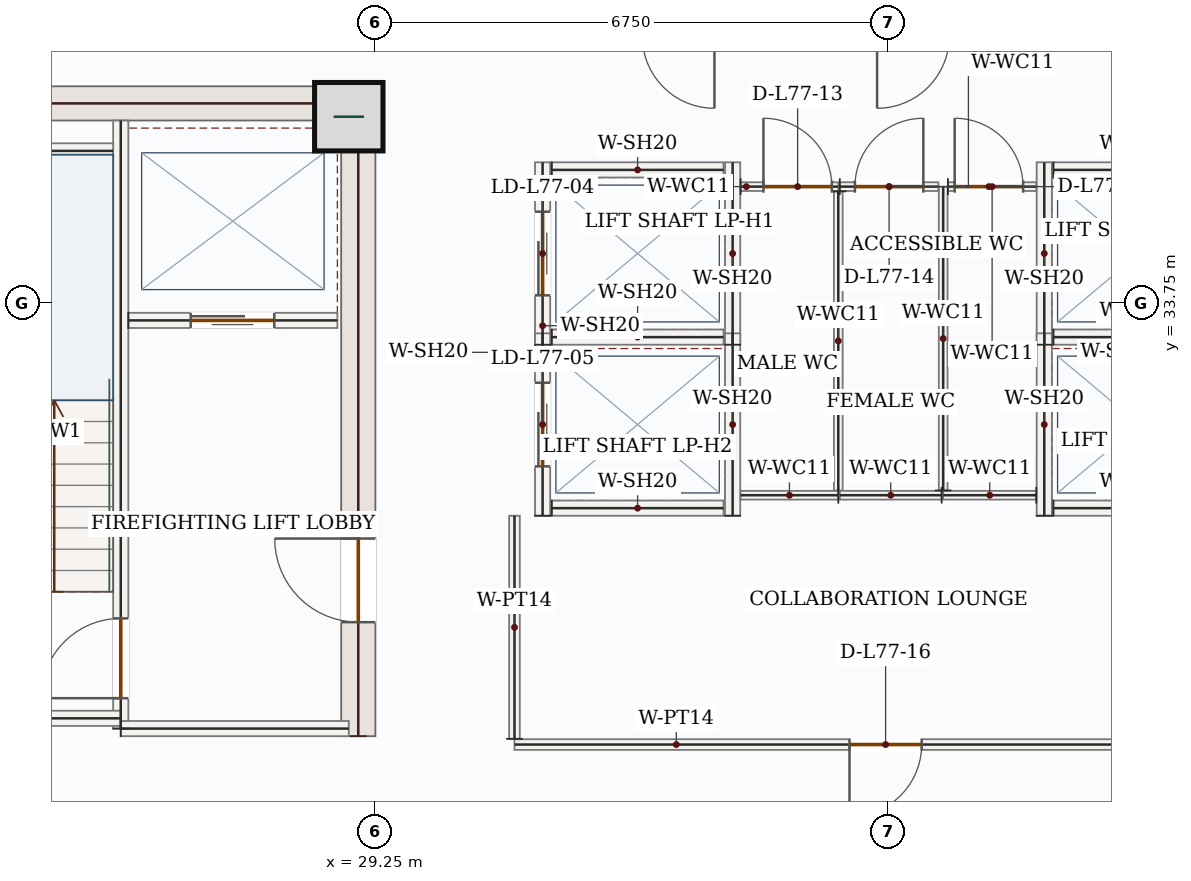
"""IFC4 building model, lengths in metres.
Left out: names, types, materials, properties, quantities, classifications, styles, units other than length and angle.
Written with IfcOpenShell. Run it as: python <this file> out.ifc"""

import sys

from ifc_helpers import new_model, si_unit, direction, frame, frame_2d, origin, origin_2d, place, context, subcontext, project, spatial, rectangle, extrude, source, transform, mapped, element, fill, save


model = new_model("IFC4")
c1 = context("Model", 3, precision=1e-05, world=origin(), true_north=direction((0.0, 1.0)))
c2 = subcontext(c1, "Body", "Model", "MODEL_VIEW")
j1 = project(units=[si_unit("LENGTHUNIT", "METRE"), si_unit("PLANEANGLEUNIT", "RADIAN")], contexts=[c1])
p1 = place(None, origin())
s1 = spatial("IfcSite", under=j1, at=p1, CompositionType="ELEMENT")
p2 = place(p1, origin())
s2 = spatial("IfcBuilding", under=s1, at=p2, CompositionType="ELEMENT")
p3 = place(p2, frame((0.0, 0.0, 319.8)))
s3 = spatial("IfcBuildingStorey", under=s2, at=p3, CompositionType="ELEMENT", Elevation=319.8)
p4 = place(p3, frame((29.025, 28.05, 0.0), z_axis=(0.0, 0.0, 1.0), x_axis=(0.0, 1.0, 0.0)))
e1 = element("IfcWall", 1, at=p4, inside=s3, PredefinedType="SHEAR", context=c2, shape_type="SweptSolid", body=[
    extrude(rectangle(XDim=8.55, YDim=0.45, at=frame_2d((4.275, 0.0))), origin(), (0.0, 0.0, 1.0), 3.5),
])
p5 = place(p4, frame((1.5, 0.0, 0.0)))
e2 = element("IfcOpeningElement", 2, at=p5, cuts=e1, PredefinedType="OPENING", context=c2, shape_type="SweptSolid", body=[
    extrude(rectangle(XDim=1.1, YDim=2.2, at=frame_2d((0.55, 1.1))), frame((0.0, 0.235, 0.0), z_axis=(0.0, -1.0, 0.0), x_axis=(1.0, 0.0, 0.0)), (0.0, 0.0, 1.0), 0.47),
])
m1 = source(origin(), c2, "Body", "SweptSolid", [
    extrude(rectangle(XDim=7.1, YDim=0.45, at=frame_2d((3.55, 0.0))), origin(), (0.0, 0.0, 1.0), 3.5),
])
p6 = place(p3, frame((21.7, 36.375, 0.0), z_axis=(0.0, 0.0, 1.0), x_axis=(1.0, 0.0, 0.0)))
e3 = element("IfcWall", 3, at=p6, inside=s3, PredefinedType="SHEAR", context=c2, shape_type="MappedRepresentation", body=[
    mapped(m1, transform((0.0, 0.0, 0.0), x_axis=(1.0, 0.0, 0.0), y_axis=(0.0, 1.0, 0.0), z_axis=(0.0, 0.0, 1.0), scale=1.0)),
])
m2 = source(origin(), c2, "Body", "SweptSolid", [
    extrude(rectangle(XDim=0.9, YDim=0.9, at=origin_2d()), origin(), (0.0, 0.0, 1.0), 3.75),
])
p7 = place(p3, frame((28.9, 36.2, 0.0), z_axis=(0.0, 0.0, 1.0), x_axis=(1.0, 0.0, 0.0)))
e4 = element("IfcColumn", 4, at=p7, inside=s3, PredefinedType="COLUMN", context=c2, shape_type="MappedRepresentation", body=[
    mapped(m2, transform((0.0, 0.0, 0.0), x_axis=(1.0, 0.0, 0.0), y_axis=(0.0, 1.0, 0.0), z_axis=(0.0, 0.0, 1.0), scale=1.0)),
])
p8 = place(p3, frame((25.9, 28.15, 0.0), z_axis=(0.0, 0.0, 1.0), x_axis=(0.0, 1.0, 0.0)))
e5 = element("IfcWall", 5, at=p8, inside=s3, PredefinedType="SOLIDWALL", context=c2, shape_type="SweptSolid", body=[
    extrude(rectangle(XDim=8.0, YDim=0.2, at=frame_2d((4.0, 0.0))), origin(), (0.0, 0.0, 1.0), 3.5),
])
p9 = place(p8, frame((0.4, 0.0, 0.0)))
e6 = element("IfcOpeningElement", 6, at=p9, cuts=e5, PredefinedType="OPENING", context=c2, shape_type="SweptSolid", body=[
    extrude(rectangle(XDim=1.05, YDim=2.15, at=frame_2d((0.525, 1.075))), frame((0.0, 0.11, 0.0), z_axis=(0.0, -1.0, 0.0), x_axis=(1.0, 0.0, 0.0)), (0.0, 0.0, 1.0), 0.22),
])
m3 = source(origin(), c2, "Body", "SweptSolid", [
    extrude(rectangle(XDim=4.25, YDim=0.2, at=frame_2d((2.125, 0.0))), origin(), (0.0, 0.0, 1.0), 3.5),
])
p10 = place(p3, frame((21.65, 28.285, 0.0), z_axis=(0.0, 0.0, 1.0), x_axis=(1.0, 0.0, 0.0)))
e7 = element("IfcWall", 7, at=p10, inside=s3, PredefinedType="SOLIDWALL", context=c2, shape_type="MappedRepresentation", body=[
    mapped(m3, transform((0.0, 0.0, 0.0), x_axis=(1.0, 0.0, 0.0), y_axis=(0.0, 1.0, 0.0), z_axis=(0.0, 0.0, 1.0), scale=1.0)),
])
m4 = source(origin(), c2, "Body", "SweptSolid", [
    extrude(rectangle(XDim=3.0, YDim=0.2, at=frame_2d((1.5, 0.0))), origin(), (0.0, 0.0, 1.0), 3.5),
])
p11 = place(p3, frame((25.9, 28.15, 0.0), z_axis=(0.0, 0.0, 1.0), x_axis=(1.0, 0.0, 0.0)))
e8 = element("IfcWall", 8, at=p11, inside=s3, PredefinedType="SOLIDWALL", context=c2, shape_type="MappedRepresentation", body=[
    mapped(m4, transform((0.0, 0.0, 0.0), x_axis=(1.0, 0.0, 0.0), y_axis=(0.0, 1.0, 0.0), z_axis=(0.0, 0.0, 1.0), scale=1.0)),
])
m5 = source(origin(), c2, "Body", "SweptSolid", [
    extrude(rectangle(XDim=3.25, YDim=0.2, at=frame_2d((1.625, 0.0))), origin(), (0.0, 0.0, 1.0), 3.5),
])
p12 = place(p3, frame((22.55, 35.75, 0.0), z_axis=(0.0, 0.0, 1.0), x_axis=(1.0, 0.0, 0.0)))
e9 = element("IfcWall", 9, at=p12, inside=s3, PredefinedType="SOLIDWALL", context=c2, shape_type="MappedRepresentation", body=[
    mapped(m5, transform((0.0, 0.0, 0.0), x_axis=(1.0, 0.0, 0.0), y_axis=(0.0, 1.0, 0.0), z_axis=(0.0, 0.0, 1.0), scale=1.0)),
])
p13 = place(p3, frame((26.0, 33.52, 0.0), z_axis=(0.0, 0.0, 1.0), x_axis=(1.0, 0.0, 0.0)))
e10 = element("IfcWall", 10, at=p13, inside=s3, PredefinedType="SOLIDWALL", context=c2, shape_type="SweptSolid", body=[
    extrude(rectangle(XDim=2.75, YDim=0.2, at=frame_2d((1.375, 0.0))), origin(), (0.0, 0.0, 1.0), 3.5),
])
p14 = place(p13, frame((0.82, 0.0, 0.0)))
e11 = element("IfcOpeningElement", 11, at=p14, cuts=e10, PredefinedType="OPENING", context=c2, shape_type="SweptSolid", body=[
    extrude(rectangle(XDim=1.1, YDim=2.15, at=frame_2d((0.55, 1.075))), frame((0.0, 0.11, 0.0), z_axis=(0.0, -1.0, 0.0), x_axis=(1.0, 0.0, 0.0)), (0.0, 0.0, 1.0), 0.22),
])
p15 = place(p3, frame((31.45, 33.2, 0.0), z_axis=(0.0, 0.0, 1.0), x_axis=(0.0, 1.0, 0.0)))
e12 = element("IfcWall", 12, at=p15, inside=s3, PredefinedType="SOLIDWALL", context=c2, shape_type="SweptSolid", body=[
    extrude(rectangle(XDim=2.4, YDim=0.2, at=frame_2d((1.2, 0.0))), origin(), (0.0, 0.0, 1.0), 3.5),
])
p16 = place(p15, frame((0.65, 0.0, 0.0)))
e13 = element("IfcOpeningElement", 13, at=p16, cuts=e12, PredefinedType="OPENING", context=c2, shape_type="SweptSolid", body=[
    extrude(rectangle(XDim=1.1, YDim=2.15, at=frame_2d((0.55, 1.075))), frame((0.0, 0.11, 0.0), z_axis=(0.0, -1.0, 0.0), x_axis=(1.0, 0.0, 0.0)), (0.0, 0.0, 1.0), 0.22),
])
m6 = source(origin(), c2, "Body", "SweptSolid", [
    extrude(rectangle(XDim=2.4, YDim=0.2, at=frame_2d((1.2, 0.0))), origin(), (0.0, 0.0, 1.0), 3.5),
])
p17 = place(p3, frame((33.95, 33.2, 0.0), z_axis=(0.0, 0.0, 1.0), x_axis=(0.0, 1.0, 0.0)))
e14 = element("IfcWall", 14, at=p17, inside=s3, PredefinedType="SOLIDWALL", context=c2, shape_type="MappedRepresentation", body=[
    mapped(m6, transform((0.0, 0.0, 0.0), x_axis=(1.0, 0.0, 0.0), y_axis=(0.0, 1.0, 0.0), z_axis=(0.0, 0.0, 1.0), scale=1.0)),
])
m7 = source(origin(), c2, "Body", "SweptSolid", [
    extrude(rectangle(XDim=2.26, YDim=0.2, at=frame_2d((1.13, 0.0))), origin(), (0.0, 0.0, 1.0), 3.5),
])
for number, where, z_axis, x_axis in (
    (15, (31.57, 33.3, 0.0), (0.0, 0.0, 1.0), (1.0, 0.0, 0.0)),
    (16, (31.57, 35.5, 0.0), (0.0, 0.0, 1.0), (1.0, 0.0, 0.0)),
):
    element("IfcWall", number, at=place(p3, frame(where, z_axis=z_axis, x_axis=x_axis)), inside=s3, PredefinedType="SOLIDWALL", context=c2, shape_type="MappedRepresentation", body=[
        mapped(m7, transform((0.0, 0.0, 0.0), x_axis=(1.0, 0.0, 0.0), y_axis=(0.0, 1.0, 0.0), z_axis=(0.0, 0.0, 1.0), scale=1.0)),
    ])
p18 = place(p3, frame((31.45, 30.95, 0.0), z_axis=(0.0, 0.0, 1.0), x_axis=(0.0, 1.0, 0.0)))
e17 = element("IfcWall", 17, at=p18, inside=s3, PredefinedType="SOLIDWALL", context=c2, shape_type="SweptSolid", body=[
    extrude(rectangle(XDim=2.4, YDim=0.2, at=frame_2d((1.2, 0.0))), origin(), (0.0, 0.0, 1.0), 3.5),
])
p19 = place(p18, frame((0.65, 0.0, 0.0)))
e18 = element("IfcOpeningElement", 18, at=p19, cuts=e17, PredefinedType="OPENING", context=c2, shape_type="SweptSolid", body=[
    extrude(rectangle(XDim=1.1, YDim=2.15, at=frame_2d((0.55, 1.075))), frame((0.0, 0.11, 0.0), z_axis=(0.0, -1.0, 0.0), x_axis=(1.0, 0.0, 0.0)), (0.0, 0.0, 1.0), 0.22),
])
p20 = place(p3, frame((33.95, 30.95, 0.0), z_axis=(0.0, 0.0, 1.0), x_axis=(0.0, 1.0, 0.0)))
e19 = element("IfcWall", 19, at=p20, inside=s3, PredefinedType="SOLIDWALL", context=c2, shape_type="MappedRepresentation", body=[
    mapped(m6, transform((0.0, 0.0, 0.0), x_axis=(1.0, 0.0, 0.0), y_axis=(0.0, 1.0, 0.0), z_axis=(0.0, 0.0, 1.0), scale=1.0)),
])
p21 = place(p3, frame((31.57, 31.05, 0.0), z_axis=(0.0, 0.0, 1.0), x_axis=(1.0, 0.0, 0.0)))
e20 = element("IfcWall", 20, at=p21, inside=s3, PredefinedType="SOLIDWALL", context=c2, shape_type="MappedRepresentation", body=[
    mapped(m7, transform((0.0, 0.0, 0.0), x_axis=(1.0, 0.0, 0.0), y_axis=(0.0, 1.0, 0.0), z_axis=(0.0, 0.0, 1.0), scale=1.0)),
])
p22 = place(p3, frame((38.05, 33.2, 0.0), z_axis=(0.0, 0.0, 1.0), x_axis=(0.0, 1.0, 0.0)))
e21 = element("IfcWall", 21, at=p22, inside=s3, PredefinedType="SOLIDWALL", context=c2, shape_type="MappedRepresentation", body=[
    mapped(m6, transform((0.0, 0.0, 0.0), x_axis=(1.0, 0.0, 0.0), y_axis=(0.0, 1.0, 0.0), z_axis=(0.0, 0.0, 1.0), scale=1.0)),
])
for number, where, z_axis, x_axis in (
    (22, (38.17, 33.3, 0.0), (0.0, 0.0, 1.0), (1.0, 0.0, 0.0)),
    (23, (38.17, 35.5, 0.0), (0.0, 0.0, 1.0), (1.0, 0.0, 0.0)),
):
    element("IfcWall", number, at=place(p3, frame(where, z_axis=z_axis, x_axis=x_axis)), inside=s3, PredefinedType="SOLIDWALL", context=c2, shape_type="MappedRepresentation", body=[
        mapped(m7, transform((0.0, 0.0, 0.0), x_axis=(1.0, 0.0, 0.0), y_axis=(0.0, 1.0, 0.0), z_axis=(0.0, 0.0, 1.0), scale=1.0)),
    ])
p23 = place(p3, frame((38.05, 30.95, 0.0), z_axis=(0.0, 0.0, 1.0), x_axis=(0.0, 1.0, 0.0)))
e24 = element("IfcWall", 24, at=p23, inside=s3, PredefinedType="SOLIDWALL", context=c2, shape_type="MappedRepresentation", body=[
    mapped(m6, transform((0.0, 0.0, 0.0), x_axis=(1.0, 0.0, 0.0), y_axis=(0.0, 1.0, 0.0), z_axis=(0.0, 0.0, 1.0), scale=1.0)),
])
p24 = place(p3, frame((38.17, 31.05, 0.0), z_axis=(0.0, 0.0, 1.0), x_axis=(1.0, 0.0, 0.0)))
e25 = element("IfcWall", 25, at=p24, inside=s3, PredefinedType="SOLIDWALL", context=c2, shape_type="MappedRepresentation", body=[
    mapped(m7, transform((0.0, 0.0, 0.0), x_axis=(1.0, 0.0, 0.0), y_axis=(0.0, 1.0, 0.0), z_axis=(0.0, 0.0, 1.0), scale=1.0)),
])
m8 = source(origin(), c2, "Body", "SweptSolid", [
    extrude(rectangle(XDim=1.225, YDim=0.115, at=frame_2d((0.613, 0.0))), origin(), (0.0, 0.0, 1.0), 3.5),
])
p25 = place(p3, frame((37.945, 31.22, 0.0), z_axis=(0.0, 0.0, 1.0), x_axis=(-1.0, 0.0, 0.0)))
e26 = element("IfcWall", 26, at=p25, inside=s3, PredefinedType="PARTITIONING", context=c2, shape_type="MappedRepresentation", body=[
    mapped(m8, transform((0.0, 0.0, 0.0), x_axis=(1.0, 0.0, 0.0), y_axis=(0.0, 1.0, 0.0), z_axis=(0.0, 0.0, 1.0), scale=1.0)),
])
m9 = source(origin(), c2, "Body", "SweptSolid", [
    extrude(rectangle(XDim=3.998, YDim=0.115, at=frame_2d((1.999, 0.0))), origin(), (0.0, 0.0, 1.0), 3.5),
])
p26 = place(p3, frame((36.72, 31.282, 0.0), z_axis=(0.0, 0.0, 1.0), x_axis=(0.0, 1.0, 0.0)))
e27 = element("IfcWall", 27, at=p26, inside=s3, PredefinedType="PARTITIONING", context=c2, shape_type="MappedRepresentation", body=[
    mapped(m9, transform((0.0, 0.0, 0.0), x_axis=(1.0, 0.0, 0.0), y_axis=(0.0, 1.0, 0.0), z_axis=(0.0, 0.0, 1.0), scale=1.0)),
])
p27 = place(p3, frame((36.782, 35.28, 0.0), z_axis=(0.0, 0.0, 1.0), x_axis=(1.0, 0.0, 0.0)))
e28 = element("IfcWall", 28, at=p27, inside=s3, PredefinedType="PARTITIONING", context=c2, shape_type="SweptSolid", body=[
    extrude(rectangle(XDim=1.163, YDim=0.115, at=frame_2d((0.581, 0.0))), origin(), (0.0, 0.0, 1.0), 3.5),
])
p28 = place(p27, frame((0.089, 0.0, 0.0)))
e29 = element("IfcOpeningElement", 29, at=p28, cuts=e28, PredefinedType="OPENING", context=c2, shape_type="SweptSolid", body=[
    extrude(rectangle(XDim=0.9, YDim=2.1, at=frame_2d((0.45, 1.05))), frame((0.0, 0.067, 0.0), z_axis=(0.0, -1.0, 0.0), x_axis=(1.0, 0.0, 0.0)), (0.0, 0.0, 1.0), 0.135),
])
m10 = source(origin(), c2, "Body", "SweptSolid", [
    extrude(rectangle(XDim=1.285, YDim=0.115, at=frame_2d((0.643, 0.0))), origin(), (0.0, 0.0, 1.0), 3.5),
])
p29 = place(p3, frame((35.34, 31.22, 0.0), z_axis=(0.0, 0.0, 1.0), x_axis=(-1.0, 0.0, 0.0)))
e30 = element("IfcWall", 30, at=p29, inside=s3, PredefinedType="PARTITIONING", context=c2, shape_type="MappedRepresentation", body=[
    mapped(m10, transform((0.0, 0.0, 0.0), x_axis=(1.0, 0.0, 0.0), y_axis=(0.0, 1.0, 0.0), z_axis=(0.0, 0.0, 1.0), scale=1.0)),
])
p30 = place(p3, frame((34.055, 35.28, 0.0), z_axis=(0.0, 0.0, 1.0), x_axis=(1.0, 0.0, 0.0)))
e31 = element("IfcWall", 31, at=p30, inside=s3, PredefinedType="PARTITIONING", context=c2, shape_type="SweptSolid", body=[
    extrude(rectangle(XDim=1.285, YDim=0.115, at=frame_2d((0.643, 0.0))), origin(), (0.0, 0.0, 1.0), 3.5),
])
p31 = place(p30, frame((0.3, 0.0, 0.0)))
e32 = element("IfcOpeningElement", 32, at=p31, cuts=e31, PredefinedType="OPENING", context=c2, shape_type="SweptSolid", body=[
    extrude(rectangle(XDim=0.9, YDim=2.1, at=frame_2d((0.45, 1.05))), frame((0.0, 0.067, 0.0), z_axis=(0.0, -1.0, 0.0), x_axis=(1.0, 0.0, 0.0)), (0.0, 0.0, 1.0), 0.135),
])
m11 = source(origin(), c2, "Body", "SweptSolid", [
    extrude(rectangle(XDim=3.935, YDim=0.115, at=frame_2d((1.968, 0.0))), origin(), (0.0, 0.0, 1.0), 3.5),
])
p32 = place(p3, frame((35.34, 35.218, 0.0), z_axis=(0.0, 0.0, 1.0), x_axis=(0.0, -1.0, 0.0)))
e33 = element("IfcWall", 33, at=p32, inside=s3, PredefinedType="PARTITIONING", context=c2, shape_type="MappedRepresentation", body=[
    mapped(m11, transform((0.0, 0.0, 0.0), x_axis=(1.0, 0.0, 0.0), y_axis=(0.0, 1.0, 0.0), z_axis=(0.0, 0.0, 1.0), scale=1.0)),
])
m12 = source(origin(), c2, "Body", "SweptSolid", [
    extrude(rectangle(XDim=1.34, YDim=0.115, at=frame_2d((0.67, 0.0))), origin(), (0.0, 0.0, 1.0), 3.5),
])
p33 = place(p3, frame((36.7, 31.22, 0.0), z_axis=(0.0, 0.0, 1.0), x_axis=(-1.0, 0.0, 0.0)))
e34 = element("IfcWall", 34, at=p33, inside=s3, PredefinedType="PARTITIONING", context=c2, shape_type="MappedRepresentation", body=[
    mapped(m12, transform((0.0, 0.0, 0.0), x_axis=(1.0, 0.0, 0.0), y_axis=(0.0, 1.0, 0.0), z_axis=(0.0, 0.0, 1.0), scale=1.0)),
])
p34 = place(p3, frame((35.36, 35.28, 0.0), z_axis=(0.0, 0.0, 1.0), x_axis=(1.0, 0.0, 0.0)))
e35 = element("IfcWall", 35, at=p34, inside=s3, PredefinedType="PARTITIONING", context=c2, shape_type="SweptSolid", body=[
    extrude(rectangle(XDim=1.297, YDim=0.115, at=frame_2d((0.649, 0.0))), origin(), (0.0, 0.0, 1.0), 3.5),
])
p35 = place(p34, frame((0.199, 0.0, 0.0)))
e36 = element("IfcOpeningElement", 36, at=p35, cuts=e35, PredefinedType="OPENING", context=c2, shape_type="SweptSolid", body=[
    extrude(rectangle(XDim=0.9, YDim=2.1, at=frame_2d((0.45, 1.05))), frame((0.0, 0.067, 0.0), z_axis=(0.0, -1.0, 0.0), x_axis=(1.0, 0.0, 0.0)), (0.0, 0.0, 1.0), 0.135),
])
p36 = place(p3, frame((40.845, 27.94, 0.0), z_axis=(0.0, 0.0, 1.0), x_axis=(-1.0, 0.0, 0.0)))
e37 = element("IfcWall", 37, at=p36, inside=s3, PredefinedType="PARTITIONING", context=c2, shape_type="SweptSolid", body=[
    extrude(rectangle(XDim=9.765, YDim=0.14, at=frame_2d((4.882, 0.0))), origin(), (0.0, 0.0, 1.0), 3.5),
])
p37 = place(p36, frame((4.407, 0.0, 0.0)))
e38 = element("IfcOpeningElement", 38, at=p37, cuts=e37, PredefinedType="OPENING", context=c2, shape_type="SweptSolid", body=[
    extrude(rectangle(XDim=0.95, YDim=2.15, at=frame_2d((0.475, 1.075))), frame((0.0, 0.08, 0.0), z_axis=(0.0, -1.0, 0.0), x_axis=(1.0, 0.0, 0.0)), (0.0, 0.0, 1.0), 0.16),
])
m13 = source(origin(), c2, "Body", "SweptSolid", [
    extrude(rectangle(XDim=2.935, YDim=0.14, at=frame_2d((1.468, 0.0))), origin(), (0.0, 0.0, 1.0), 3.5),
])
p38 = place(p3, frame((31.08, 28.015, 0.0), z_axis=(0.0, 0.0, 1.0), x_axis=(0.0, 1.0, 0.0)))
e39 = element("IfcWall", 39, at=p38, inside=s3, PredefinedType="PARTITIONING", context=c2, shape_type="MappedRepresentation", body=[
    mapped(m13, transform((0.0, 0.0, 0.0), x_axis=(1.0, 0.0, 0.0), y_axis=(0.0, 1.0, 0.0), z_axis=(0.0, 0.0, 1.0), scale=1.0)),
])
m14 = source(origin(), c2, "Body", "SweptSolid", [
    extrude(rectangle(XDim=1.05, YDim=2.15, at=frame_2d((0.525, 1.075))), frame((0.0, 0.025, 0.0), z_axis=(0.0, -1.0, 0.0), x_axis=(1.0, 0.0, 0.0)), (0.0, 0.0, 1.0), 0.05),
])
p39 = place(p9, origin())
e40 = element("IfcDoor", 40, at=p39, inside=s3, OperationType="SINGLE_SWING_LEFT", PredefinedType="DOOR", context=c2, shape_type="MappedRepresentation", body=[
    mapped(m14, transform((0.0, 0.0, 0.0), x_axis=(1.0, 0.0, 0.0), y_axis=(0.0, 1.0, 0.0), z_axis=(0.0, 0.0, 1.0), scale=1.0)),
])
fill(e6, e40)
m15 = source(origin(), c2, "Body", "SweptSolid", [
    extrude(rectangle(XDim=1.1, YDim=2.15, at=frame_2d((0.55, 1.075))), frame((0.0, 0.025, 0.0), z_axis=(0.0, -1.0, 0.0), x_axis=(1.0, 0.0, 0.0)), (0.0, 0.0, 1.0), 0.05),
])
p40 = place(p14, origin())
e41 = element("IfcDoor", 41, at=p40, inside=s3, OperationType="DOUBLE_DOOR_SLIDING", PredefinedType="DOOR", context=c2, shape_type="MappedRepresentation", body=[
    mapped(m15, transform((0.0, 0.0, 0.0), x_axis=(1.0, 0.0, 0.0), y_axis=(0.0, 1.0, 0.0), z_axis=(0.0, 0.0, 1.0), scale=1.0)),
])
fill(e11, e41)
m16 = source(origin(), c2, "Body", "SweptSolid", [
    extrude(rectangle(XDim=1.1, YDim=2.2, at=frame_2d((0.55, 1.1))), frame((0.0, 0.025, 0.0), z_axis=(0.0, -1.0, 0.0), x_axis=(1.0, 0.0, 0.0)), (0.0, 0.0, 1.0), 0.05),
])
p41 = place(p5, origin())
e42 = element("IfcDoor", 42, at=p41, inside=s3, OperationType="SINGLE_SWING_RIGHT", PredefinedType="DOOR", context=c2, shape_type="MappedRepresentation", body=[
    mapped(m16, transform((0.0, 0.0, 0.0), x_axis=(1.0, 0.0, 0.0), y_axis=(0.0, 1.0, 0.0), z_axis=(0.0, 0.0, 1.0), scale=1.0)),
])
fill(e2, e42)
p42 = place(p16, origin())
e43 = element("IfcDoor", 43, at=p42, inside=s3, OperationType="DOUBLE_DOOR_SLIDING", PredefinedType="DOOR", context=c2, shape_type="MappedRepresentation", body=[
    mapped(m15, transform((0.0, 0.0, 0.0), x_axis=(1.0, 0.0, 0.0), y_axis=(0.0, 1.0, 0.0), z_axis=(0.0, 0.0, 1.0), scale=1.0)),
])
fill(e13, e43)
p43 = place(p19, origin())
e44 = element("IfcDoor", 44, at=p43, inside=s3, OperationType="DOUBLE_DOOR_SLIDING", PredefinedType="DOOR", context=c2, shape_type="MappedRepresentation", body=[
    mapped(m15, transform((0.0, 0.0, 0.0), x_axis=(1.0, 0.0, 0.0), y_axis=(0.0, 1.0, 0.0), z_axis=(0.0, 0.0, 1.0), scale=1.0)),
])
fill(e18, e44)
m17 = source(origin(), c2, "Body", "SweptSolid", [
    extrude(rectangle(XDim=0.9, YDim=2.1, at=frame_2d((0.45, 1.05))), frame((0.0, 0.025, 0.0), z_axis=(0.0, -1.0, 0.0), x_axis=(1.0, 0.0, 0.0)), (0.0, 0.0, 1.0), 0.05),
])
p44 = place(p31, origin())
e45 = element("IfcDoor", 45, at=p44, inside=s3, OperationType="SINGLE_SWING_LEFT", PredefinedType="DOOR", context=c2, shape_type="MappedRepresentation", body=[
    mapped(m17, transform((0.0, 0.0, 0.0), x_axis=(1.0, 0.0, 0.0), y_axis=(0.0, 1.0, 0.0), z_axis=(0.0, 0.0, 1.0), scale=1.0)),
])
fill(e32, e45)
p45 = place(p35, origin())
e46 = element("IfcDoor", 46, at=p45, inside=s3, OperationType="SINGLE_SWING_RIGHT", PredefinedType="DOOR", context=c2, shape_type="MappedRepresentation", body=[
    mapped(m17, transform((0.0, 0.0, 0.0), x_axis=(1.0, 0.0, 0.0), y_axis=(0.0, 1.0, 0.0), z_axis=(0.0, 0.0, 1.0), scale=1.0)),
])
fill(e36, e46)
p46 = place(p28, origin())
e47 = element("IfcDoor", 47, at=p46, inside=s3, OperationType="SINGLE_SWING_LEFT", PredefinedType="DOOR", context=c2, shape_type="MappedRepresentation", body=[
    mapped(m17, transform((0.0, 0.0, 0.0), x_axis=(1.0, 0.0, 0.0), y_axis=(0.0, 1.0, 0.0), z_axis=(0.0, 0.0, 1.0), scale=1.0)),
])
fill(e29, e47)
m18 = source(origin(), c2, "Body", "SweptSolid", [
    extrude(rectangle(XDim=0.95, YDim=2.15, at=frame_2d((0.475, 1.075))), frame((0.0, 0.025, 0.0), z_axis=(0.0, -1.0, 0.0), x_axis=(1.0, 0.0, 0.0)), (0.0, 0.0, 1.0), 0.05),
])
p47 = place(p37, origin())
e48 = element("IfcDoor", 48, at=p47, inside=s3, OperationType="SINGLE_SWING_RIGHT", PredefinedType="DOOR", context=c2, shape_type="MappedRepresentation", body=[
    mapped(m18, transform((0.0, 0.0, 0.0), x_axis=(1.0, 0.0, 0.0), y_axis=(0.0, 1.0, 0.0), z_axis=(0.0, 0.0, 1.0), scale=1.0)),
])
fill(e38, e48)
save(model, sys.argv[1])
